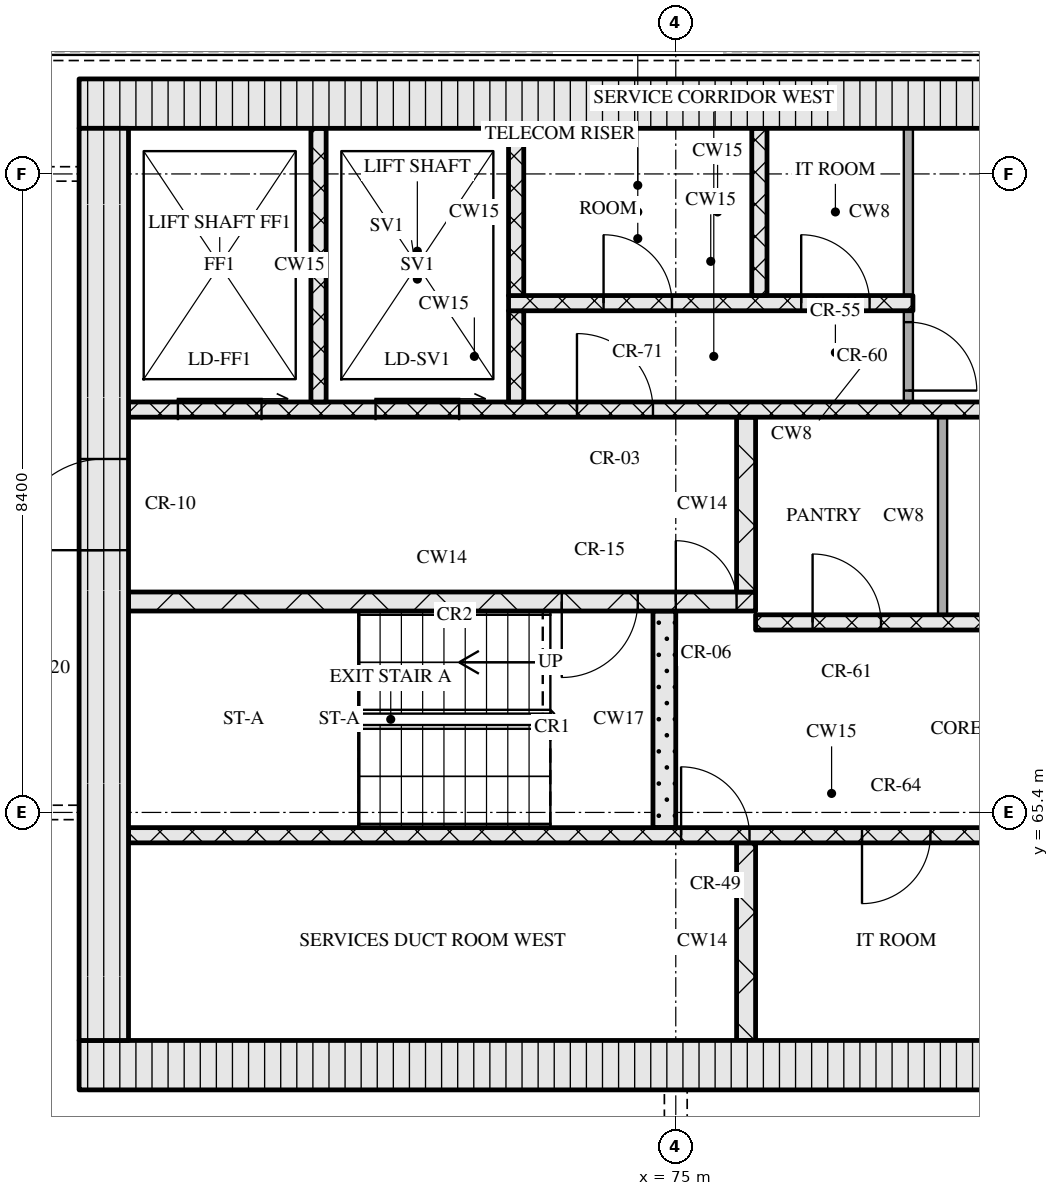
"""IFC4 building model, lengths in metres.
Left out: names, types, materials, properties, quantities, classifications, styles, units other than length and angle.
Written with IfcOpenShell. Run it as: python <this file> out.ifc"""

import sys

from ifc_helpers import new_model, si_unit, direction, frame, frame_2d, origin, place, context, subcontext, project, spatial, rectangle, extrude, element, fill, save


model = new_model("IFC4")
c1 = context("Model", 3, precision=1e-05, world=origin(), true_north=direction((0.0, 1.0)))
c2 = subcontext(c1, "Body", "Model", "MODEL_VIEW")
j1 = project(units=[si_unit("LENGTHUNIT", "METRE"), si_unit("PLANEANGLEUNIT", "RADIAN")], contexts=[c1])
p1 = place(None, origin())
s1 = spatial("IfcSite", under=j1, at=p1, CompositionType="ELEMENT")
p2 = place(p1, origin())
s2 = spatial("IfcBuilding", under=s1, at=p2, CompositionType="ELEMENT")
p3 = place(p2, frame((0.0, 0.0, 245.1)))
s3 = spatial("IfcBuildingStorey", under=s2, at=p3, CompositionType="ELEMENT", Elevation=245.1)
p4 = place(p3, frame((67.15, 62.075, 0.0), z_axis=(0.0, 0.0, 1.0), x_axis=(1.0, 0.0, 0.0)))
e1 = element("IfcWall", 1, at=p4, inside=s3, PredefinedType="SOLIDWALL", context=c2, shape_type="SweptSolid", body=[
    extrude(rectangle(XDim=40.9, YDim=0.65, at=frame_2d((20.45, 0.0))), origin(), (0.0, 0.0, 1.0), 3.32),
])
p5 = place(p4, frame((20.8, 0.0, 0.0)))
e2 = element("IfcOpeningElement", 2, at=p5, cuts=e1, PredefinedType="OPENING", context=c2, shape_type="SweptSolid", body=[
    extrude(rectangle(XDim=1.8, YDim=2.1, at=frame_2d((0.9, 1.05))), frame((0.0, 0.335, 0.0), z_axis=(0.0, -1.0, 0.0), x_axis=(1.0, 0.0, 0.0)), (0.0, 0.0, 1.0), 0.67),
])
p6 = place(p3, frame((67.15, 74.725, 0.0), z_axis=(0.0, 0.0, 1.0), x_axis=(1.0, 0.0, 0.0)))
e3 = element("IfcWall", 3, at=p6, inside=s3, PredefinedType="SOLIDWALL", context=c2, shape_type="SweptSolid", body=[
    extrude(rectangle(XDim=40.9, YDim=0.65, at=frame_2d((20.45, 0.0))), origin(), (0.0, 0.0, 1.0), 3.32),
])
p7 = place(p3, frame((67.475, 62.4, 0.0), z_axis=(0.0, 0.0, 1.0), x_axis=(0.0, 1.0, 0.0)))
e4 = element("IfcWall", 4, at=p7, inside=s3, PredefinedType="SOLIDWALL", context=c2, shape_type="SweptSolid", body=[
    extrude(rectangle(XDim=12.0, YDim=0.65, at=frame_2d((6.0, 0.0))), origin(), (0.0, 0.0, 1.0), 3.32),
])
p8 = place(p7, frame((6.45, 0.0, 0.0)))
e5 = element("IfcOpeningElement", 5, at=p8, cuts=e4, PredefinedType="OPENING", context=c2, shape_type="SweptSolid", body=[
    extrude(rectangle(XDim=1.2, YDim=2.1, at=frame_2d((0.6, 1.05))), frame((0.0, 0.335, 0.0), z_axis=(0.0, -1.0, 0.0), x_axis=(1.0, 0.0, 0.0)), (0.0, 0.0, 1.0), 0.67),
])
p9 = place(p3, frame((75.925, 62.4, 0.0), z_axis=(0.0, 0.0, 1.0), x_axis=(0.0, 1.0, 0.0)))
e6 = element("IfcWall", 6, at=p9, inside=s3, PredefinedType="SOLIDWALL", context=c2, shape_type="SweptSolid", body=[
    extrude(rectangle(XDim=2.6, YDim=0.25, at=frame_2d((1.3, 0.0))), origin(), (0.0, 0.0, 1.0), 3.32),
])
p10 = place(p3, frame((67.8, 65.1, 0.0), z_axis=(0.0, 0.0, 1.0), x_axis=(1.0, 0.0, 0.0)))
e7 = element("IfcWall", 7, at=p10, inside=s3, PredefinedType="SOLIDWALL", context=c2, shape_type="SweptSolid", body=[
    extrude(rectangle(XDim=18.5, YDim=0.2, at=frame_2d((9.25, 0.0))), origin(), (0.0, 0.0, 1.0), 3.32),
])
p11 = place(p10, frame((7.27, 0.0, 0.0)))
e8 = element("IfcOpeningElement", 8, at=p11, cuts=e7, PredefinedType="OPENING", context=c2, shape_type="SweptSolid", body=[
    extrude(rectangle(XDim=0.9, YDim=2.1, at=frame_2d((0.45, 1.05))), frame((0.0, 0.11, 0.0), z_axis=(0.0, -1.0, 0.0), x_axis=(1.0, 0.0, 0.0)), (0.0, 0.0, 1.0), 0.22),
])
p12 = place(p10, frame((9.65, 0.0, 0.0)))
e9 = element("IfcOpeningElement", 9, at=p12, cuts=e7, PredefinedType="OPENING", context=c2, shape_type="SweptSolid", body=[
    extrude(rectangle(XDim=0.9, YDim=2.1, at=frame_2d((0.45, 1.05))), frame((0.0, 0.11, 0.0), z_axis=(0.0, -1.0, 0.0), x_axis=(1.0, 0.0, 0.0)), (0.0, 0.0, 1.0), 0.22),
])
p13 = place(p10, frame((13.36, 0.0, 0.0)))
e10 = element("IfcOpeningElement", 10, at=p13, cuts=e7, PredefinedType="OPENING", context=c2, shape_type="SweptSolid", body=[
    extrude(rectangle(XDim=0.9, YDim=2.1, at=frame_2d((0.45, 1.05))), frame((0.0, 0.11, 0.0), z_axis=(0.0, -1.0, 0.0), x_axis=(1.0, 0.0, 0.0)), (0.0, 0.0, 1.0), 0.22),
])
p14 = place(p10, frame((16.7, 0.0, 0.0)))
e11 = element("IfcOpeningElement", 11, at=p14, cuts=e7, PredefinedType="OPENING", context=c2, shape_type="SweptSolid", body=[
    extrude(rectangle(XDim=0.9, YDim=2.1, at=frame_2d((0.45, 1.05))), frame((0.0, 0.11, 0.0), z_axis=(0.0, -1.0, 0.0), x_axis=(1.0, 0.0, 0.0)), (0.0, 0.0, 1.0), 0.22),
])
p15 = place(p3, frame((74.85, 65.2, 0.0), z_axis=(0.0, 0.0, 1.0), x_axis=(0.0, 1.0, 0.0)))
e12 = element("IfcWall", 12, at=p15, inside=s3, PredefinedType="SOLIDWALL", context=c2, shape_type="SweptSolid", body=[
    extrude(rectangle(XDim=2.85, YDim=0.3, at=frame_2d((1.425, 0.0))), origin(), (0.0, 0.0, 1.0), 3.32),
])
p16 = place(p3, frame((76.05, 67.9, 0.0), z_axis=(0.0, 0.0, 1.0), x_axis=(1.0, 0.0, 0.0)))
e13 = element("IfcWall", 13, at=p16, inside=s3, PredefinedType="SOLIDWALL", context=c2, shape_type="SweptSolid", body=[
    extrude(rectangle(XDim=23.1, YDim=0.2, at=frame_2d((11.55, 0.0))), origin(), (0.0, 0.0, 1.0), 3.32),
])
p17 = place(p16, frame((0.75, 0.0, 0.0)))
e14 = element("IfcOpeningElement", 14, at=p17, cuts=e13, PredefinedType="OPENING", context=c2, shape_type="SweptSolid", body=[
    extrude(rectangle(XDim=0.9, YDim=2.1, at=frame_2d((0.45, 1.05))), frame((0.0, 0.11, 0.0), z_axis=(0.0, -1.0, 0.0), x_axis=(1.0, 0.0, 0.0)), (0.0, 0.0, 1.0), 0.22),
])
p18 = place(p16, frame((3.32, 0.0, 0.0)))
e15 = element("IfcOpeningElement", 15, at=p18, cuts=e13, PredefinedType="OPENING", context=c2, shape_type="SweptSolid", body=[
    extrude(rectangle(XDim=0.9, YDim=2.1, at=frame_2d((0.45, 1.05))), frame((0.0, 0.11, 0.0), z_axis=(0.0, -1.0, 0.0), x_axis=(1.0, 0.0, 0.0)), (0.0, 0.0, 1.0), 0.22),
])
p19 = place(p16, frame((5.77, 0.0, 0.0)))
e16 = element("IfcOpeningElement", 16, at=p19, cuts=e13, PredefinedType="OPENING", context=c2, shape_type="SweptSolid", body=[
    extrude(rectangle(XDim=0.9, YDim=2.1, at=frame_2d((0.45, 1.05))), frame((0.0, 0.11, 0.0), z_axis=(0.0, -1.0, 0.0), x_axis=(1.0, 0.0, 0.0)), (0.0, 0.0, 1.0), 0.22),
])
p20 = place(p16, frame((8.45, 0.0, 0.0)))
e17 = element("IfcOpeningElement", 17, at=p20, cuts=e13, PredefinedType="OPENING", context=c2, shape_type="SweptSolid", body=[
    extrude(rectangle(XDim=0.9, YDim=2.1, at=frame_2d((0.45, 1.05))), frame((0.0, 0.11, 0.0), z_axis=(0.0, -1.0, 0.0), x_axis=(1.0, 0.0, 0.0)), (0.0, 0.0, 1.0), 0.22),
])
p21 = place(p16, frame((10.91, 0.0, 0.0)))
e18 = element("IfcOpeningElement", 18, at=p21, cuts=e13, PredefinedType="OPENING", context=c2, shape_type="SweptSolid", body=[
    extrude(rectangle(XDim=0.9, YDim=2.1, at=frame_2d((0.45, 1.05))), frame((0.0, 0.11, 0.0), z_axis=(0.0, -1.0, 0.0), x_axis=(1.0, 0.0, 0.0)), (0.0, 0.0, 1.0), 0.22),
])
p22 = place(p16, frame((13.55, 0.0, 0.0)))
e19 = element("IfcOpeningElement", 19, at=p22, cuts=e13, PredefinedType="OPENING", context=c2, shape_type="SweptSolid", body=[
    extrude(rectangle(XDim=1.0, YDim=2.1, at=frame_2d((0.5, 1.05))), frame((0.0, 0.11, 0.0), z_axis=(0.0, -1.0, 0.0), x_axis=(1.0, 0.0, 0.0)), (0.0, 0.0, 1.0), 0.22),
])
p23 = place(p16, frame((16.2, 0.0, 0.0)))
e20 = element("IfcOpeningElement", 20, at=p23, cuts=e13, PredefinedType="OPENING", context=c2, shape_type="SweptSolid", body=[
    extrude(rectangle(XDim=1.1, YDim=2.1, at=frame_2d((0.55, 1.05))), frame((0.0, 0.11, 0.0), z_axis=(0.0, -1.0, 0.0), x_axis=(1.0, 0.0, 0.0)), (0.0, 0.0, 1.0), 0.22),
])
p24 = place(p16, frame((18.7, 0.0, 0.0)))
e21 = element("IfcOpeningElement", 21, at=p24, cuts=e13, PredefinedType="OPENING", context=c2, shape_type="SweptSolid", body=[
    extrude(rectangle(XDim=1.1, YDim=2.1, at=frame_2d((0.55, 1.05))), frame((0.0, 0.11, 0.0), z_axis=(0.0, -1.0, 0.0), x_axis=(1.0, 0.0, 0.0)), (0.0, 0.0, 1.0), 0.22),
])
p25 = place(p16, frame((21.2, 0.0, 0.0)))
e22 = element("IfcOpeningElement", 22, at=p25, cuts=e13, PredefinedType="OPENING", context=c2, shape_type="SweptSolid", body=[
    extrude(rectangle(XDim=1.1, YDim=2.1, at=frame_2d((0.55, 1.05))), frame((0.0, 0.11, 0.0), z_axis=(0.0, -1.0, 0.0), x_axis=(1.0, 0.0, 0.0)), (0.0, 0.0, 1.0), 0.22),
])
p26 = place(p3, frame((78.51, 68.0, 0.0), z_axis=(0.0, 0.0, 1.0), x_axis=(0.0, 1.0, 0.0)))
e23 = element("IfcWall", 23, at=p26, inside=s3, PredefinedType="PARTITIONING", context=c2, shape_type="SweptSolid", body=[
    extrude(rectangle(XDim=2.6, YDim=0.12, at=frame_2d((1.3, 0.0))), origin(), (0.0, 0.0, 1.0), 3.32),
])
p27 = place(p3, frame((67.8, 68.175, 0.0), z_axis=(0.0, 0.0, 1.0), x_axis=(1.0, 0.0, 0.0)))
e24 = element("IfcWall", 24, at=p27, inside=s3, PredefinedType="SOLIDWALL", context=c2, shape_type="SweptSolid", body=[
    extrude(rectangle(XDim=8.25, YDim=0.25, at=frame_2d((4.125, 0.0))), origin(), (0.0, 0.0, 1.0), 3.32),
])
p28 = place(p27, frame((5.7, 0.0, 0.0)))
e25 = element("IfcOpeningElement", 25, at=p28, cuts=e24, PredefinedType="OPENING", context=c2, shape_type="SweptSolid", body=[
    extrude(rectangle(XDim=1.0, YDim=2.1, at=frame_2d((0.5, 1.05))), frame((0.0, 0.135, 0.0), z_axis=(0.0, -1.0, 0.0), x_axis=(1.0, 0.0, 0.0)), (0.0, 0.0, 1.0), 0.27),
])
p29 = place(p27, frame((7.2, 0.0, 0.0)))
e26 = element("IfcOpeningElement", 26, at=p29, cuts=e24, PredefinedType="OPENING", context=c2, shape_type="SweptSolid", body=[
    extrude(rectangle(XDim=0.8, YDim=2.1, at=frame_2d((0.4, 1.05))), frame((0.0, 0.135, 0.0), z_axis=(0.0, -1.0, 0.0), x_axis=(1.0, 0.0, 0.0)), (0.0, 0.0, 1.0), 0.27),
])
p30 = place(p3, frame((75.925, 68.3, 0.0), z_axis=(0.0, 0.0, 1.0), x_axis=(0.0, 1.0, 0.0)))
e27 = element("IfcWall", 27, at=p30, inside=s3, PredefinedType="SOLIDWALL", context=c2, shape_type="SweptSolid", body=[
    extrude(rectangle(XDim=2.3, YDim=0.25, at=frame_2d((1.15, 0.0))), origin(), (0.0, 0.0, 1.0), 3.32),
])
p31 = place(p3, frame((67.8, 70.7, 0.0), z_axis=(0.0, 0.0, 1.0), x_axis=(1.0, 0.0, 0.0)))
e28 = element("IfcWall", 28, at=p31, inside=s3, PredefinedType="SOLIDWALL", context=c2, shape_type="SweptSolid", body=[
    extrude(rectangle(XDim=39.6, YDim=0.2, at=frame_2d((19.8, 0.0))), origin(), (0.0, 0.0, 1.0), 3.32),
])
p32 = place(p31, frame((0.65, 0.0, 0.0)))
e29 = element("IfcOpeningElement", 29, at=p32, cuts=e28, PredefinedType="OPENING", context=c2, shape_type="SweptSolid", body=[
    extrude(rectangle(XDim=1.1, YDim=2.1, at=frame_2d((0.55, 1.05))), frame((0.0, 0.11, 0.0), z_axis=(0.0, -1.0, 0.0), x_axis=(1.0, 0.0, 0.0)), (0.0, 0.0, 1.0), 0.22),
])
p33 = place(p31, frame((3.25, 0.0, 0.0)))
e30 = element("IfcOpeningElement", 30, at=p33, cuts=e28, PredefinedType="OPENING", context=c2, shape_type="SweptSolid", body=[
    extrude(rectangle(XDim=1.1, YDim=2.1, at=frame_2d((0.55, 1.05))), frame((0.0, 0.11, 0.0), z_axis=(0.0, -1.0, 0.0), x_axis=(1.0, 0.0, 0.0)), (0.0, 0.0, 1.0), 0.22),
])
p34 = place(p31, frame((5.9, 0.0, 0.0)))
e31 = element("IfcOpeningElement", 31, at=p34, cuts=e28, PredefinedType="OPENING", context=c2, shape_type="SweptSolid", body=[
    extrude(rectangle(XDim=1.0, YDim=2.1, at=frame_2d((0.5, 1.05))), frame((0.0, 0.11, 0.0), z_axis=(0.0, -1.0, 0.0), x_axis=(1.0, 0.0, 0.0)), (0.0, 0.0, 1.0), 0.22),
])
p35 = place(p31, frame((21.7, 0.0, 0.0)))
e32 = element("IfcOpeningElement", 32, at=p35, cuts=e28, PredefinedType="OPENING", context=c2, shape_type="SweptSolid", body=[
    extrude(rectangle(XDim=1.0, YDim=2.1, at=frame_2d((0.5, 1.05))), frame((0.0, 0.11, 0.0), z_axis=(0.0, -1.0, 0.0), x_axis=(1.0, 0.0, 0.0)), (0.0, 0.0, 1.0), 0.22),
])
p36 = place(p31, frame((32.7, 0.0, 0.0)))
e33 = element("IfcOpeningElement", 33, at=p36, cuts=e28, PredefinedType="OPENING", context=c2, shape_type="SweptSolid", body=[
    extrude(rectangle(XDim=1.0, YDim=2.1, at=frame_2d((0.5, 1.05))), frame((0.0, 0.11, 0.0), z_axis=(0.0, -1.0, 0.0), x_axis=(1.0, 0.0, 0.0)), (0.0, 0.0, 1.0), 0.22),
])
p37 = place(p31, frame((35.25, 0.0, 0.0)))
e34 = element("IfcOpeningElement", 34, at=p37, cuts=e28, PredefinedType="OPENING", context=c2, shape_type="SweptSolid", body=[
    extrude(rectangle(XDim=1.1, YDim=2.1, at=frame_2d((0.55, 1.05))), frame((0.0, 0.11, 0.0), z_axis=(0.0, -1.0, 0.0), x_axis=(1.0, 0.0, 0.0)), (0.0, 0.0, 1.0), 0.22),
])
p38 = place(p31, frame((37.85, 0.0, 0.0)))
e35 = element("IfcOpeningElement", 35, at=p38, cuts=e28, PredefinedType="OPENING", context=c2, shape_type="SweptSolid", body=[
    extrude(rectangle(XDim=1.1, YDim=2.1, at=frame_2d((0.55, 1.05))), frame((0.0, 0.11, 0.0), z_axis=(0.0, -1.0, 0.0), x_axis=(1.0, 0.0, 0.0)), (0.0, 0.0, 1.0), 0.22),
])
p39 = place(p3, frame((70.3, 70.8, 0.0), z_axis=(0.0, 0.0, 1.0), x_axis=(0.0, 1.0, 0.0)))
e36 = element("IfcWall", 36, at=p39, inside=s3, PredefinedType="SOLIDWALL", context=c2, shape_type="SweptSolid", body=[
    extrude(rectangle(XDim=3.6, YDim=0.2, at=frame_2d((1.8, 0.0))), origin(), (0.0, 0.0, 1.0), 3.32),
])
p40 = place(p3, frame((72.9, 70.8, 0.0), z_axis=(0.0, 0.0, 1.0), x_axis=(0.0, 1.0, 0.0)))
e37 = element("IfcWall", 37, at=p40, inside=s3, PredefinedType="SOLIDWALL", context=c2, shape_type="SweptSolid", body=[
    extrude(rectangle(XDim=1.2, YDim=0.2, at=frame_2d((0.6, 0.0))), origin(), (0.0, 0.0, 1.0), 3.32),
])
p41 = place(p3, frame((78.06, 70.8, 0.0), z_axis=(0.0, 0.0, 1.0), x_axis=(0.0, 1.0, 0.0)))
e38 = element("IfcWall", 38, at=p41, inside=s3, PredefinedType="PARTITIONING", context=c2, shape_type="SweptSolid", body=[
    extrude(rectangle(XDim=1.2, YDim=0.12, at=frame_2d((0.6, 0.0))), origin(), (0.0, 0.0, 1.0), 3.32),
])
p42 = place(p41, frame((0.15, 0.0, 0.0)))
e39 = element("IfcOpeningElement", 39, at=p42, cuts=e38, PredefinedType="OPENING", context=c2, shape_type="SweptSolid", body=[
    extrude(rectangle(XDim=0.9, YDim=2.1, at=frame_2d((0.45, 1.05))), frame((0.0, 0.07, 0.0), z_axis=(0.0, -1.0, 0.0), x_axis=(1.0, 0.0, 0.0)), (0.0, 0.0, 1.0), 0.14),
])
p43 = place(p3, frame((72.8, 72.1, 0.0), z_axis=(0.0, 0.0, 1.0), x_axis=(1.0, 0.0, 0.0)))
e40 = element("IfcWall", 40, at=p43, inside=s3, PredefinedType="SOLIDWALL", context=c2, shape_type="SweptSolid", body=[
    extrude(rectangle(XDim=5.32, YDim=0.2, at=frame_2d((2.66, 0.0))), origin(), (0.0, 0.0, 1.0), 3.32),
])
p44 = place(p43, frame((1.25, 0.0, 0.0)))
e41 = element("IfcOpeningElement", 41, at=p44, cuts=e40, PredefinedType="OPENING", context=c2, shape_type="SweptSolid", body=[
    extrude(rectangle(XDim=0.9, YDim=2.1, at=frame_2d((0.45, 1.05))), frame((0.0, 0.11, 0.0), z_axis=(0.0, -1.0, 0.0), x_axis=(1.0, 0.0, 0.0)), (0.0, 0.0, 1.0), 0.22),
])
p45 = place(p43, frame((3.85, 0.0, 0.0)))
e42 = element("IfcOpeningElement", 42, at=p45, cuts=e40, PredefinedType="OPENING", context=c2, shape_type="SweptSolid", body=[
    extrude(rectangle(XDim=0.9, YDim=2.1, at=frame_2d((0.45, 1.05))), frame((0.0, 0.11, 0.0), z_axis=(0.0, -1.0, 0.0), x_axis=(1.0, 0.0, 0.0)), (0.0, 0.0, 1.0), 0.22),
])
for number, where, z_axis, x_axis in (
    (43, (72.9, 72.2, 0.0), (0.0, 0.0, 1.0), (0.0, 1.0, 0.0)),
    (44, (76.1, 72.2, 0.0), (0.0, 0.0, 1.0), (0.0, 1.0, 0.0)),
):
    element("IfcWall", number, at=place(p3, frame(where, z_axis=z_axis, x_axis=x_axis)), inside=s3, PredefinedType="SOLIDWALL", context=c2, shape_type="SweptSolid", body=[
        extrude(rectangle(XDim=2.2, YDim=0.2, at=frame_2d((1.1, 0.0))), origin(), (0.0, 0.0, 1.0), 3.32),
    ])
p46 = place(p3, frame((78.06, 72.2, 0.0), z_axis=(0.0, 0.0, 1.0), x_axis=(0.0, 1.0, 0.0)))
e45 = element("IfcWall", 45, at=p46, inside=s3, PredefinedType="PARTITIONING", context=c2, shape_type="SweptSolid", body=[
    extrude(rectangle(XDim=2.2, YDim=0.12, at=frame_2d((1.1, 0.0))), origin(), (0.0, 0.0, 1.0), 3.32),
])
p47 = place(p11, origin())
e46 = element("IfcDoor", 46, at=p47, inside=s3, OperationType="SINGLE_SWING_LEFT", PredefinedType="DOOR", context=c2, shape_type="SweptSolid", body=[
    extrude(rectangle(XDim=0.9, YDim=2.1, at=frame_2d((0.45, 1.05))), frame((0.0, 0.025, 0.0), z_axis=(0.0, -1.0, 0.0), x_axis=(1.0, 0.0, 0.0)), (0.0, 0.0, 1.0), 0.05),
])
fill(e8, e46)
p48 = place(p12, origin())
e47 = element("IfcDoor", 47, at=p48, inside=s3, OperationType="SINGLE_SWING_RIGHT", PredefinedType="DOOR", context=c2, shape_type="SweptSolid", body=[
    extrude(rectangle(XDim=0.9, YDim=2.1, at=frame_2d((0.45, 1.05))), frame((0.0, 0.025, 0.0), z_axis=(0.0, -1.0, 0.0), x_axis=(1.0, 0.0, 0.0)), (0.0, 0.0, 1.0), 0.05),
])
fill(e9, e47)
p49 = place(p17, origin())
e48 = element("IfcDoor", 48, at=p49, inside=s3, OperationType="SINGLE_SWING_LEFT", PredefinedType="DOOR", context=c2, shape_type="SweptSolid", body=[
    extrude(rectangle(XDim=0.9, YDim=2.1, at=frame_2d((0.45, 1.05))), frame((0.0, 0.025, 0.0), z_axis=(0.0, -1.0, 0.0), x_axis=(1.0, 0.0, 0.0)), (0.0, 0.0, 1.0), 0.05),
])
fill(e14, e48)
p50 = place(p28, origin())
e49 = element("IfcDoor", 49, at=p50, inside=s3, OperationType="SINGLE_SWING_RIGHT", PredefinedType="DOOR", context=c2, shape_type="SweptSolid", body=[
    extrude(rectangle(XDim=1.0, YDim=2.1, at=frame_2d((0.5, 1.05))), frame((0.0, 0.025, 0.0), z_axis=(0.0, -1.0, 0.0), x_axis=(1.0, 0.0, 0.0)), (0.0, 0.0, 1.0), 0.05),
])
fill(e25, e49)
p51 = place(p29, origin())
e50 = element("IfcDoor", 50, at=p51, inside=s3, OperationType="SINGLE_SWING_LEFT", PredefinedType="DOOR", context=c2, shape_type="SweptSolid", body=[
    extrude(rectangle(XDim=0.8, YDim=2.1, at=frame_2d((0.4, 1.05))), frame((0.0, 0.025, 0.0), z_axis=(0.0, -1.0, 0.0), x_axis=(1.0, 0.0, 0.0)), (0.0, 0.0, 1.0), 0.05),
])
fill(e26, e50)
p52 = place(p8, origin())
e51 = element("IfcDoor", 51, at=p52, inside=s3, OperationType="SINGLE_SWING_LEFT", PredefinedType="DOOR", context=c2, shape_type="SweptSolid", body=[
    extrude(rectangle(XDim=1.2, YDim=2.1, at=frame_2d((0.6, 1.05))), frame((0.0, 0.025, 0.0), z_axis=(0.0, -1.0, 0.0), x_axis=(1.0, 0.0, 0.0)), (0.0, 0.0, 1.0), 0.05),
])
fill(e5, e51)
p53 = place(p32, origin())
e52 = element("IfcDoor", 52, at=p53, inside=s3, OperationType="SLIDING_TO_RIGHT", PredefinedType="DOOR", context=c2, shape_type="SweptSolid", body=[
    extrude(rectangle(XDim=1.1, YDim=2.1, at=frame_2d((0.55, 1.05))), frame((0.0, 0.025, 0.0), z_axis=(0.0, -1.0, 0.0), x_axis=(1.0, 0.0, 0.0)), (0.0, 0.0, 1.0), 0.05),
])
fill(e29, e52)
p54 = place(p33, origin())
e53 = element("IfcDoor", 53, at=p54, inside=s3, OperationType="SLIDING_TO_RIGHT", PredefinedType="DOOR", context=c2, shape_type="SweptSolid", body=[
    extrude(rectangle(XDim=1.1, YDim=2.1, at=frame_2d((0.55, 1.05))), frame((0.0, 0.025, 0.0), z_axis=(0.0, -1.0, 0.0), x_axis=(1.0, 0.0, 0.0)), (0.0, 0.0, 1.0), 0.05),
])
fill(e30, e53)
p55 = place(p34, origin())
e54 = element("IfcDoor", 54, at=p55, inside=s3, OperationType="SINGLE_SWING_LEFT", PredefinedType="DOOR", context=c2, shape_type="SweptSolid", body=[
    extrude(rectangle(XDim=1.0, YDim=2.1, at=frame_2d((0.5, 1.05))), frame((0.0, 0.025, 0.0), z_axis=(0.0, -1.0, 0.0), x_axis=(1.0, 0.0, 0.0)), (0.0, 0.0, 1.0), 0.05),
])
fill(e31, e54)
p56 = place(p42, origin())
e55 = element("IfcDoor", 55, at=p56, inside=s3, OperationType="SINGLE_SWING_RIGHT", PredefinedType="DOOR", context=c2, shape_type="SweptSolid", body=[
    extrude(rectangle(XDim=0.9, YDim=2.1, at=frame_2d((0.45, 1.05))), frame((0.0, 0.025, 0.0), z_axis=(0.0, -1.0, 0.0), x_axis=(1.0, 0.0, 0.0)), (0.0, 0.0, 1.0), 0.05),
])
fill(e39, e55)
p57 = place(p44, origin())
e56 = element("IfcDoor", 56, at=p57, inside=s3, OperationType="SINGLE_SWING_LEFT", PredefinedType="DOOR", context=c2, shape_type="SweptSolid", body=[
    extrude(rectangle(XDim=0.9, YDim=2.1, at=frame_2d((0.45, 1.05))), frame((0.0, 0.025, 0.0), z_axis=(0.0, -1.0, 0.0), x_axis=(1.0, 0.0, 0.0)), (0.0, 0.0, 1.0), 0.05),
])
fill(e41, e56)
p58 = place(p45, origin())
e57 = element("IfcDoor", 57, at=p58, inside=s3, OperationType="SINGLE_SWING_LEFT", PredefinedType="DOOR", context=c2, shape_type="SweptSolid", body=[
    extrude(rectangle(XDim=0.9, YDim=2.1, at=frame_2d((0.45, 1.05))), frame((0.0, 0.025, 0.0), z_axis=(0.0, -1.0, 0.0), x_axis=(1.0, 0.0, 0.0)), (0.0, 0.0, 1.0), 0.05),
])
fill(e42, e57)
save(model, sys.argv[1])
